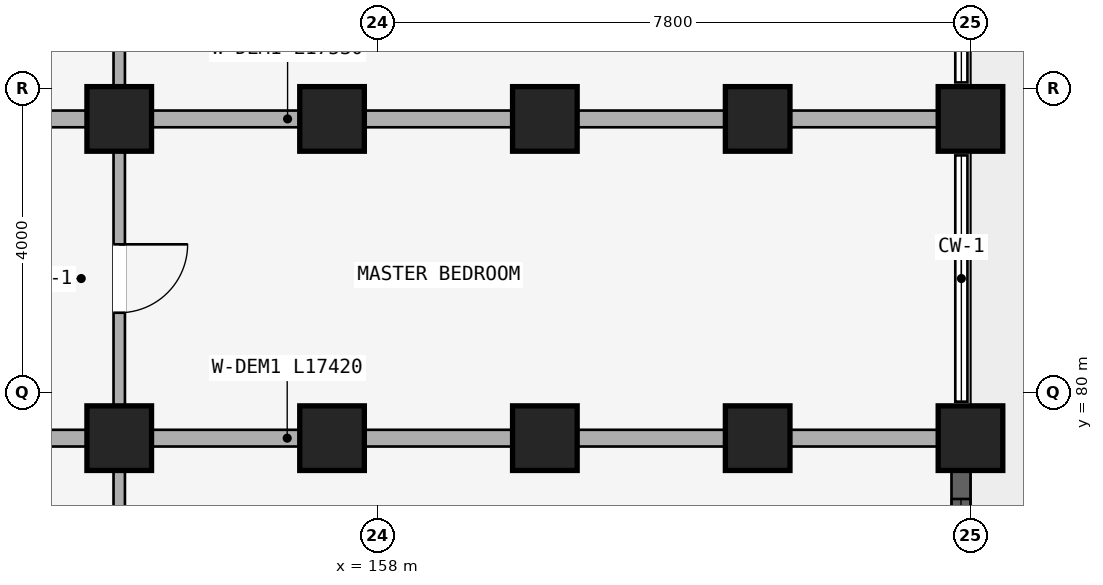
"""IFC4 building model, lengths in metres.
Left out: names, types, materials, properties, quantities, classifications, styles, units other than length and angle.
Written with IfcOpenShell. Run it as: python <this file> out.ifc"""

import sys

from ifc_helpers import new_model, si_unit, direction, frame, frame_2d, origin, origin_2d, place, context, subcontext, project, spatial, rectangle, extrude, element, fill, save


model = new_model("IFC4")
c1 = context("Model", 3, precision=1e-05, world=origin(), true_north=direction((0.0, 1.0)))
c2 = subcontext(c1, "Body", "Model", "MODEL_VIEW")
j1 = project(units=[si_unit("LENGTHUNIT", "METRE"), si_unit("PLANEANGLEUNIT", "RADIAN")], contexts=[c1])
p1 = place(None, origin())
s1 = spatial("IfcSite", under=j1, at=p1, CompositionType="ELEMENT")
p2 = place(p1, origin())
s2 = spatial("IfcBuilding", under=s1, at=p2, CompositionType="ELEMENT")
p3 = place(p2, origin())
s3 = spatial("IfcBuildingStorey", under=s2, at=p3, CompositionType="ELEMENT", Elevation=0.0)
for number, where, z_axis, x_axis in (
    (1, (154.6, 83.6, 0.0), (0.0, 0.0, 1.0), (1.0, 0.0, 0.0)),
    (2, (157.4, 83.6, 0.0), (0.0, 0.0, 1.0), (1.0, 0.0, 0.0)),
    (3, (160.2, 83.6, 0.0), (0.0, 0.0, 1.0), (1.0, 0.0, 0.0)),
    (4, (163.0, 83.6, 0.0), (0.0, 0.0, 1.0), (1.0, 0.0, 0.0)),
    (5, (165.8, 83.6, 0.0), (0.0, 0.0, 1.0), (1.0, 0.0, 0.0)),
    (6, (154.6, 79.4, 0.0), (0.0, 0.0, 1.0), (1.0, 0.0, 0.0)),
    (7, (157.4, 79.4, 0.0), (0.0, 0.0, 1.0), (1.0, 0.0, 0.0)),
    (8, (160.2, 79.4, 0.0), (0.0, 0.0, 1.0), (1.0, 0.0, 0.0)),
    (9, (163.0, 79.4, 0.0), (0.0, 0.0, 1.0), (1.0, 0.0, 0.0)),
    (10, (165.8, 79.4, 0.0), (0.0, 0.0, 1.0), (1.0, 0.0, 0.0)),
):
    element("IfcColumn", number, at=place(p3, frame(where, z_axis=z_axis, x_axis=x_axis)), inside=s3, PredefinedType="COLUMN", context=c2, shape_type="SweptSolid", body=[
        extrude(rectangle(XDim=0.85, YDim=0.85, at=origin_2d()), origin(), (0.0, 0.0, 1.0), 4.15),
    ])
p4 = place(p3, frame((154.6, 87.57, 0.0), z_axis=(0.0, 0.0, 1.0), x_axis=(0.0, -1.0, 0.0)))
e11 = element("IfcWall", 11, at=p4, inside=s3, PredefinedType="PARTITIONING", context=c2, shape_type="SweptSolid", body=[
    extrude(rectangle(XDim=3.89, YDim=0.15, at=frame_2d((1.945, 0.0))), origin(), (0.0, 0.0, 1.0), 3.492),
])
p5 = place(p4, frame((1.495, 0.0, 0.0)))
e12 = element("IfcOpeningElement", 12, at=p5, cuts=e11, PredefinedType="OPENING", context=c2, shape_type="SweptSolid", body=[
    extrude(rectangle(XDim=0.9, YDim=2.1, at=frame_2d((0.45, 1.05))), frame((0.0, 0.085, 0.0), z_axis=(0.0, -1.0, 0.0), x_axis=(1.0, 0.0, 0.0)), (0.0, 0.0, 1.0), 0.17),
])
p6 = place(p3, frame((154.6, 83.52, 0.0), z_axis=(0.0, 0.0, 1.0), x_axis=(0.0, -1.0, 0.0)))
e13 = element("IfcWall", 13, at=p6, inside=s3, PredefinedType="PARTITIONING", context=c2, shape_type="SweptSolid", body=[
    extrude(rectangle(XDim=4.04, YDim=0.15, at=frame_2d((2.02, 0.0))), origin(), (0.0, 0.0, 1.0), 3.492),
])
p7 = place(p6, frame((1.57, 0.0, 0.0)))
e14 = element("IfcOpeningElement", 14, at=p7, cuts=e13, PredefinedType="OPENING", context=c2, shape_type="SweptSolid", body=[
    extrude(rectangle(XDim=0.9, YDim=2.1, at=frame_2d((0.45, 1.05))), frame((0.0, 0.085, 0.0), z_axis=(0.0, -1.0, 0.0), x_axis=(1.0, 0.0, 0.0)), (0.0, 0.0, 1.0), 0.17),
])
p8 = place(p3, frame((148.05, 83.6, 0.0), z_axis=(0.0, 0.0, 1.0), x_axis=(1.0, 0.0, 0.0)))
e15 = element("IfcWall", 15, at=p8, inside=s3, PredefinedType="STANDARD", context=c2, shape_type="SweptSolid", body=[
    extrude(rectangle(XDim=17.53, YDim=0.22, at=frame_2d((8.765, 0.0))), origin(), (0.0, 0.0, 1.0), 3.492),
])
p9 = place(p3, frame((154.6, 79.32, 0.0), z_axis=(0.0, 0.0, 1.0), x_axis=(0.0, -1.0, 0.0)))
e16 = element("IfcWall", 16, at=p9, inside=s3, PredefinedType="PLUMBINGWALL", context=c2, shape_type="SweptSolid", body=[
    extrude(rectangle(XDim=2.64, YDim=0.15, at=frame_2d((1.32, 0.0))), origin(), (0.0, 0.0, 1.0), 3.492),
])
p10 = place(p9, frame((0.87, 0.0, 0.0)))
e17 = element("IfcOpeningElement", 17, at=p10, cuts=e16, PredefinedType="OPENING", context=c2, shape_type="SweptSolid", body=[
    extrude(rectangle(XDim=0.9, YDim=2.1, at=frame_2d((0.45, 1.05))), frame((0.0, 0.085, 0.0), z_axis=(0.0, -1.0, 0.0), x_axis=(1.0, 0.0, 0.0)), (0.0, 0.0, 1.0), 0.17),
])
p11 = place(p3, frame((148.1, 79.4, 0.0), z_axis=(0.0, 0.0, 1.0), x_axis=(1.0, 0.0, 0.0)))
e18 = element("IfcWall", 18, at=p11, inside=s3, PredefinedType="STANDARD", context=c2, shape_type="SweptSolid", body=[
    extrude(rectangle(XDim=17.42, YDim=0.22, at=frame_2d((8.71, 0.0))), origin(), (0.0, 0.0, 1.0), 3.492),
])
p12 = place(p3, frame((165.675, 78.98, 0.0), z_axis=(0.0, 0.0, 1.0), x_axis=(0.0, -1.0, 0.0)))
e19 = element("IfcWall", 19, at=p12, inside=s3, PredefinedType="STANDARD", context=c2, shape_type="SweptSolid", body=[
    extrude(rectangle(XDim=1.96, YDim=0.25, at=frame_2d((0.98, 0.0))), origin(), (0.0, 0.0, 1.0), 3.692),
])
p13 = place(p12, frame((0.38, 0.0, 0.88)))
e20 = element("IfcOpeningElement", 20, at=p13, cuts=e19, PredefinedType="OPENING", context=c2, shape_type="SweptSolid", body=[
    extrude(rectangle(XDim=1.2, YDim=1.5, at=frame_2d((0.6, 0.75))), frame((0.0, 0.135, 0.0), z_axis=(0.0, -1.0, 0.0), x_axis=(1.0, 0.0, 0.0)), (0.0, 0.0, 1.0), 0.27),
])
p14 = place(p13, origin())
e21 = element("IfcWindow", 21, at=p14, inside=s3, PartitioningType="SINGLE_PANEL", PredefinedType="WINDOW", context=c2, shape_type="SweptSolid", body=[
    extrude(rectangle(XDim=1.2, YDim=1.5, at=frame_2d((0.6, 0.75))), frame((0.0, 0.03, 0.0), z_axis=(0.0, -1.0, 0.0), x_axis=(1.0, 0.0, 0.0)), (0.0, 0.0, 1.0), 0.06),
])
fill(e20, e21)
p15 = place(p7, origin())
e22 = element("IfcDoor", 22, at=p15, inside=s3, OperationType="SINGLE_SWING_LEFT", PredefinedType="DOOR", context=c2, shape_type="SweptSolid", body=[
    extrude(rectangle(XDim=0.9, YDim=2.1, at=frame_2d((0.45, 1.05))), frame((0.0, 0.025, 0.0), z_axis=(0.0, -1.0, 0.0), x_axis=(1.0, 0.0, 0.0)), (0.0, 0.0, 1.0), 0.05),
])
fill(e14, e22)
save(model, sys.argv[1])
